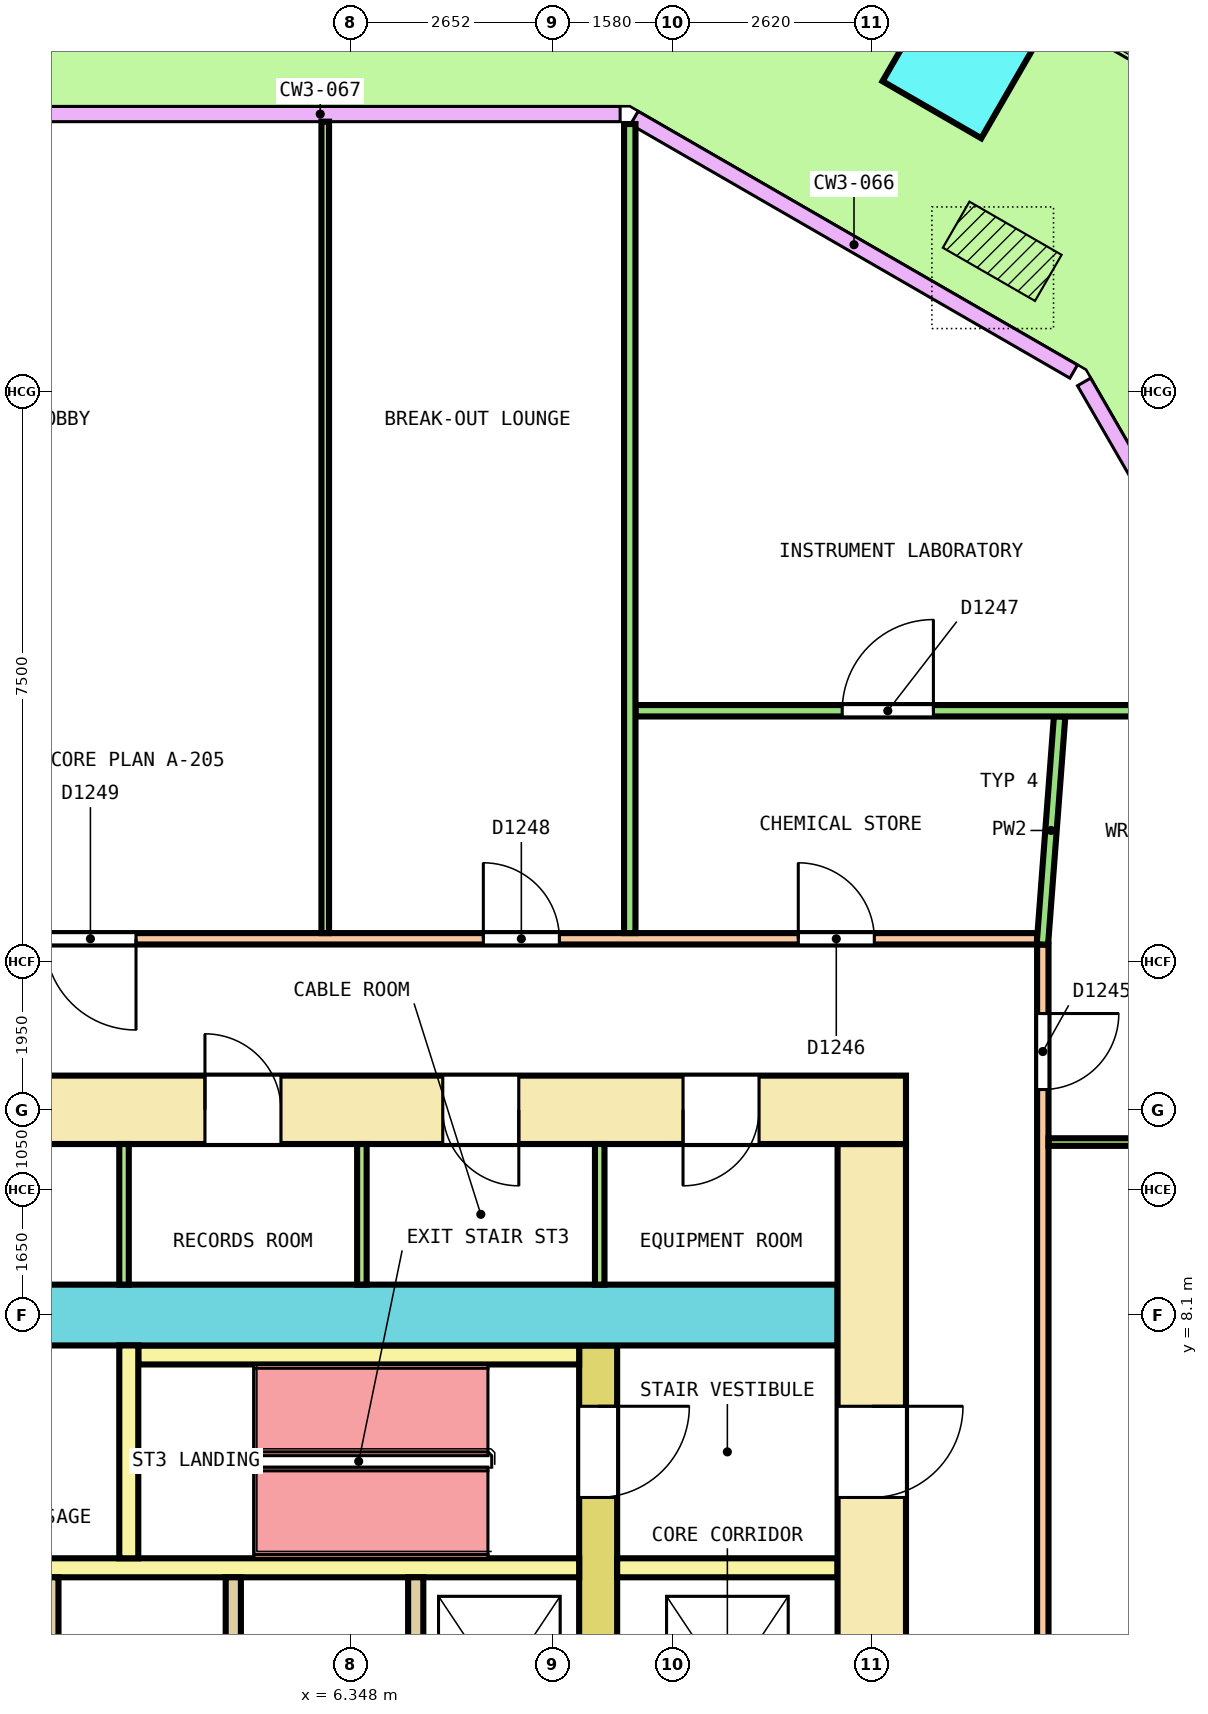
"""IFC4 building model, lengths in metres.
Left out: names, types, materials, properties, quantities, classifications, styles, units other than length and angle.
Written with IfcOpenShell. Run it as: python <this file> out.ifc"""

import sys

from ifc_helpers import new_model, si_unit, direction, frame, frame_2d, origin, origin_2d, place, context, subcontext, project, spatial, rectangle, extrude, element, fill, save


model = new_model("IFC4")
c1 = context("Model", 3, precision=1e-05, world=origin(), true_north=direction((0.0, 1.0)))
c2 = subcontext(c1, "Body", "Model", "MODEL_VIEW")
j1 = project(units=[si_unit("LENGTHUNIT", "METRE"), si_unit("PLANEANGLEUNIT", "RADIAN")], contexts=[c1])
p1 = place(None, origin())
s1 = spatial("IfcSite", under=j1, at=p1, CompositionType="ELEMENT")
p2 = place(p1, origin())
s2 = spatial("IfcBuilding", under=s1, at=p2, CompositionType="ELEMENT")
p3 = place(p2, frame((0.0, 0.0, 19.0)))
s3 = spatial("IfcBuildingStorey", under=s2, at=p3, CompositionType="ELEMENT", Elevation=19.0)
p4 = place(p3, frame((14.366, 24.606, 0.0), z_axis=(0.036205074038, 0.0, 0.999344381389), x_axis=(-0.865315435316, 0.500246354177, 0.031349362627)))
e1 = element("IfcColumn", 1, at=p4, inside=s3, PredefinedType="COLUMN", context=c2, shape_type="SweptSolid", body=[
    extrude(rectangle(XDim=1.5, YDim=1.5, at=origin_2d()), origin(), (0.0, 0.0, 1.0), 4.053),
])
p5 = place(p3, frame((-13.65, 10.8, 0.0), z_axis=(0.0, 0.0, 1.0), x_axis=(1.0, 0.0, 0.0)))
e2 = element("IfcWall", 2, at=p5, inside=s3, PredefinedType="SHEAR", context=c2, shape_type="SweptSolid", body=[
    extrude(rectangle(XDim=27.3, YDim=0.9, at=frame_2d((13.65, 0.0))), origin(), (0.0, 0.0, 1.0), 4.1),
])
p6 = place(p5, frame((1.892, 0.0, 0.0)))
e3 = element("IfcOpeningElement", 3, at=p6, cuts=e2, PredefinedType="OPENING", context=c2, shape_type="SweptSolid", body=[
    extrude(rectangle(XDim=1.0, YDim=2.1, at=frame_2d((0.5, 1.05))), frame((0.0, 0.46, 0.0), z_axis=(0.0, -1.0, 0.0), x_axis=(1.0, 0.0, 0.0)), (0.0, 0.0, 1.0), 0.92),
])
p7 = place(p5, frame((4.97, 0.0, 0.0)))
e4 = element("IfcOpeningElement", 4, at=p7, cuts=e2, PredefinedType="OPENING", context=c2, shape_type="SweptSolid", body=[
    extrude(rectangle(XDim=1.0, YDim=2.1, at=frame_2d((0.5, 1.05))), frame((0.0, 0.46, 0.0), z_axis=(0.0, -1.0, 0.0), x_axis=(1.0, 0.0, 0.0)), (0.0, 0.0, 1.0), 0.92),
])
p8 = place(p5, frame((8.017, 0.0, 0.0)))
e5 = element("IfcOpeningElement", 5, at=p8, cuts=e2, PredefinedType="OPENING", context=c2, shape_type="SweptSolid", body=[
    extrude(rectangle(XDim=1.0, YDim=2.1, at=frame_2d((0.5, 1.05))), frame((0.0, 0.46, 0.0), z_axis=(0.0, -1.0, 0.0), x_axis=(1.0, 0.0, 0.0)), (0.0, 0.0, 1.0), 0.92),
])
p9 = place(p5, frame((11.064, 0.0, 0.0)))
e6 = element("IfcOpeningElement", 6, at=p9, cuts=e2, PredefinedType="OPENING", context=c2, shape_type="SweptSolid", body=[
    extrude(rectangle(XDim=1.0, YDim=2.1, at=frame_2d((0.5, 1.05))), frame((0.0, 0.46, 0.0), z_axis=(0.0, -1.0, 0.0), x_axis=(1.0, 0.0, 0.0)), (0.0, 0.0, 1.0), 0.92),
])
p10 = place(p5, frame((18.077, 0.0, 0.0)))
e7 = element("IfcOpeningElement", 7, at=p10, cuts=e2, PredefinedType="OPENING", context=c2, shape_type="SweptSolid", body=[
    extrude(rectangle(XDim=1.0, YDim=2.1, at=frame_2d((0.5, 1.05))), frame((0.0, 0.46, 0.0), z_axis=(0.0, -1.0, 0.0), x_axis=(1.0, 0.0, 0.0)), (0.0, 0.0, 1.0), 0.92),
])
p11 = place(p5, frame((21.206, 0.0, 0.0)))
e8 = element("IfcOpeningElement", 8, at=p11, cuts=e2, PredefinedType="OPENING", context=c2, shape_type="SweptSolid", body=[
    extrude(rectangle(XDim=1.0, YDim=2.1, at=frame_2d((0.5, 1.05))), frame((0.0, 0.46, 0.0), z_axis=(0.0, -1.0, 0.0), x_axis=(1.0, 0.0, 0.0)), (0.0, 0.0, 1.0), 0.92),
])
p12 = place(p5, frame((24.367, 0.0, 0.0)))
e9 = element("IfcOpeningElement", 9, at=p12, cuts=e2, PredefinedType="OPENING", context=c2, shape_type="SweptSolid", body=[
    extrude(rectangle(XDim=1.0, YDim=2.1, at=frame_2d((0.5, 1.05))), frame((0.0, 0.46, 0.0), z_axis=(0.0, -1.0, 0.0), x_axis=(1.0, 0.0, 0.0)), (0.0, 0.0, 1.0), 0.92),
])
p13 = place(p5, frame((14.575, 0.0, 0.0)))
e10 = element("IfcOpeningElement", 10, at=p13, cuts=e2, PredefinedType="OPENING", context=c2, shape_type="SweptSolid", body=[
    extrude(rectangle(XDim=1.4, YDim=2.1, at=frame_2d((0.7, 1.05))), frame((0.0, 0.46, 0.0), z_axis=(0.0, -1.0, 0.0), x_axis=(1.0, 0.0, 0.0)), (0.0, 0.0, 1.0), 0.92),
])
p14 = place(p3, frame((13.2, -10.35, 0.0), z_axis=(0.0, 0.0, 1.0), x_axis=(0.0, 1.0, 0.0)))
e11 = element("IfcWall", 11, at=p14, inside=s3, PredefinedType="SHEAR", context=c2, shape_type="SweptSolid", body=[
    extrude(rectangle(XDim=20.7, YDim=0.9, at=frame_2d((10.35, 0.0))), origin(), (0.0, 0.0, 1.0), 4.1),
])
p15 = place(p14, frame((9.15, 0.0, 0.0)))
e12 = element("IfcOpeningElement", 12, at=p15, cuts=e11, PredefinedType="OPENING", context=c2, shape_type="SweptSolid", body=[
    extrude(rectangle(XDim=2.4, YDim=2.1, at=frame_2d((1.2, 1.05))), frame((0.0, 0.46, 0.0), z_axis=(0.0, -1.0, 0.0), x_axis=(1.0, 0.0, 0.0)), (0.0, 0.0, 1.0), 0.92),
])
p16 = place(p14, frame((16.05, 0.0, 0.0)))
e13 = element("IfcOpeningElement", 13, at=p16, cuts=e11, PredefinedType="OPENING", context=c2, shape_type="SweptSolid", body=[
    extrude(rectangle(XDim=1.2, YDim=2.1, at=frame_2d((0.6, 1.05))), frame((0.0, 0.46, 0.0), z_axis=(0.0, -1.0, 0.0), x_axis=(1.0, 0.0, 0.0)), (0.0, 0.0, 1.0), 0.92),
])
p17 = place(p14, frame((3.55, 0.0, 0.0)))
e14 = element("IfcOpeningElement", 14, at=p17, cuts=e11, PredefinedType="OPENING", context=c2, shape_type="SweptSolid", body=[
    extrude(rectangle(XDim=1.0, YDim=2.1, at=frame_2d((0.5, 1.05))), frame((0.0, 0.46, 0.0), z_axis=(0.0, -1.0, 0.0), x_axis=(1.0, 0.0, 0.0)), (0.0, 0.0, 1.0), 0.92),
])
p18 = place(p3, frame((-12.75, 8.1, 0.0), z_axis=(0.0, 0.0, 1.0), x_axis=(1.0, 0.0, 0.0)))
e15 = element("IfcWall", 15, at=p18, inside=s3, PredefinedType="SHEAR", context=c2, shape_type="SweptSolid", body=[
    extrude(rectangle(XDim=25.5, YDim=0.8, at=frame_2d((12.75, 0.0))), origin(), (0.0, 0.0, 1.0), 4.1),
])
p19 = place(p18, frame((13.675, 0.0, 0.0)))
e16 = element("IfcOpeningElement", 16, at=p19, cuts=e15, PredefinedType="OPENING", context=c2, shape_type="SweptSolid", body=[
    extrude(rectangle(XDim=1.4, YDim=2.1, at=frame_2d((0.7, 1.05))), frame((0.0, 0.41, 0.0), z_axis=(0.0, -1.0, 0.0), x_axis=(1.0, 0.0, 0.0)), (0.0, 0.0, 1.0), 0.82),
])
p20 = place(p3, frame((9.6, -7.7, 0.0), z_axis=(0.0, 0.0, 1.0), x_axis=(0.0, 1.0, 0.0)))
e17 = element("IfcWall", 17, at=p20, inside=s3, PredefinedType="SHEAR", context=c2, shape_type="SweptSolid", body=[
    extrude(rectangle(XDim=15.4, YDim=0.5, at=frame_2d((7.7, 0.0))), origin(), (0.0, 0.0, 1.0), 4.1),
])
p21 = place(p20, frame((6.5, 0.0, 0.0)))
e18 = element("IfcOpeningElement", 18, at=p21, cuts=e17, PredefinedType="OPENING", context=c2, shape_type="SweptSolid", body=[
    extrude(rectangle(XDim=2.4, YDim=2.1, at=frame_2d((1.2, 1.05))), frame((0.0, 0.26, 0.0), z_axis=(0.0, -1.0, 0.0), x_axis=(1.0, 0.0, 0.0)), (0.0, 0.0, 1.0), 0.52),
])
p22 = place(p20, frame((13.4, 0.0, 0.0)))
e19 = element("IfcOpeningElement", 19, at=p22, cuts=e17, PredefinedType="OPENING", context=c2, shape_type="SweptSolid", body=[
    extrude(rectangle(XDim=1.2, YDim=2.1, at=frame_2d((0.6, 1.05))), frame((0.0, 0.26, 0.0), z_axis=(0.0, -1.0, 0.0), x_axis=(1.0, 0.0, 0.0)), (0.0, 0.0, 1.0), 0.52),
])
p23 = place(p20, frame((0.9, 0.0, 0.0)))
e20 = element("IfcOpeningElement", 20, at=p23, cuts=e17, PredefinedType="OPENING", context=c2, shape_type="SweptSolid", body=[
    extrude(rectangle(XDim=1.0, YDim=2.1, at=frame_2d((0.5, 1.05))), frame((0.0, 0.26, 0.0), z_axis=(0.0, -1.0, 0.0), x_axis=(1.0, 0.0, 0.0)), (0.0, 0.0, 1.0), 0.52),
])
p24 = place(p3, frame((-9.35, 4.775, 0.0), z_axis=(0.0, 0.0, 1.0), x_axis=(1.0, 0.0, 0.0)))
e21 = element("IfcWall", 21, at=p24, inside=s3, PredefinedType="SOLIDWALL", context=c2, shape_type="SweptSolid", body=[
    extrude(rectangle(XDim=18.7, YDim=0.25, at=frame_2d((9.35, 0.0))), origin(), (0.0, 0.0, 1.0), 4.1),
])
p25 = place(p3, frame((9.85, 4.775, 0.0), z_axis=(0.0, 0.0, 1.0), x_axis=(1.0, 0.0, 0.0)))
e22 = element("IfcWall", 22, at=p25, inside=s3, PredefinedType="SOLIDWALL", context=c2, shape_type="SweptSolid", body=[
    extrude(rectangle(XDim=2.9, YDim=0.25, at=frame_2d((1.45, 0.0))), origin(), (0.0, 0.0, 1.0), 4.1),
])
for number, where, z_axis, x_axis in (
    (23, (2.4, 1.75, 0.0), (0.0, 0.0, 1.0), (0.0, 1.0, 0.0)),
    (24, (4.8, 1.75, 0.0), (0.0, 0.0, 1.0), (0.0, 1.0, 0.0)),
    (25, (7.2, 1.75, 0.0), (0.0, 0.0, 1.0), (0.0, 1.0, 0.0)),
):
    element("IfcWall", number, at=place(p3, frame(where, z_axis=z_axis, x_axis=x_axis)), inside=s3, PredefinedType="SOLIDWALL", context=c2, shape_type="SweptSolid", body=[
        extrude(rectangle(XDim=2.9, YDim=0.2, at=frame_2d((1.45, 0.0))), origin(), (0.0, 0.0, 1.0), 4.1),
    ])
p26 = place(p3, frame((3.55, 7.575, 0.0), z_axis=(0.0, 0.0, 1.0), x_axis=(1.0, 0.0, 0.0)))
e26 = element("IfcWall", 26, at=p26, inside=s3, PredefinedType="SOLIDWALL", context=c2, shape_type="SweptSolid", body=[
    extrude(rectangle(XDim=5.8, YDim=0.25, at=frame_2d((2.9, 0.0))), origin(), (0.0, 0.0, 1.0), 4.1),
])
p27 = place(p3, frame((3.425, 4.9, 0.0), z_axis=(0.0, 0.0, 1.0), x_axis=(0.0, 1.0, 0.0)))
e27 = element("IfcWall", 27, at=p27, inside=s3, PredefinedType="SOLIDWALL", context=c2, shape_type="SweptSolid", body=[
    extrude(rectangle(XDim=2.8, YDim=0.25, at=frame_2d((1.4, 0.0))), origin(), (0.0, 0.0, 1.0), 4.1),
])
for number, where, z_axis, x_axis in (
    (28, (3.363, 8.5, 0.0), (0.0, 0.0, 1.0), (0.0, 1.0, 0.0)),
    (29, (6.492, 8.5, 0.0), (0.0, 0.0, 1.0), (0.0, 1.0, 0.0)),
    (30, (9.621, 8.5, 0.0), (0.0, 0.0, 1.0), (0.0, 1.0, 0.0)),
):
    element("IfcWall", number, at=place(p3, frame(where, z_axis=z_axis, x_axis=x_axis)), inside=s3, PredefinedType="PARTITIONING", context=c2, shape_type="SweptSolid", body=[
        extrude(rectangle(XDim=1.85, YDim=0.125, at=frame_2d((0.925, 0.0))), origin(), (0.0, 0.0, 1.0), 4.1),
    ])
p28 = place(p3, frame((15.45, -12.975, 0.0), z_axis=(0.0, 0.0, 1.0), x_axis=(0.0, 1.0, 0.0)))
e31 = element("IfcWall", 31, at=p28, inside=s3, PredefinedType="PARTITIONING", context=c2, shape_type="SweptSolid", body=[
    extrude(rectangle(XDim=25.95, YDim=0.15, at=frame_2d((12.975, 0.0))), origin(), (0.0, 0.0, 1.0), 3.05),
])
p29 = place(p28, frame((12.95, 0.0, 0.0)))
e32 = element("IfcOpeningElement", 32, at=p29, cuts=e31, PredefinedType="OPENING", context=c2, shape_type="SweptSolid", body=[
    extrude(rectangle(XDim=1.2, YDim=2.1, at=frame_2d((0.6, 1.05))), frame((0.0, 0.085, 0.0), z_axis=(0.0, -1.0, 0.0), x_axis=(1.0, 0.0, 0.0)), (0.0, 0.0, 1.0), 0.17),
])
p30 = place(p28, frame((24.042, 0.0, 0.0)))
e33 = element("IfcOpeningElement", 33, at=p30, cuts=e31, PredefinedType="OPENING", context=c2, shape_type="SweptSolid", body=[
    extrude(rectangle(XDim=1.0, YDim=2.1, at=frame_2d((0.5, 1.05))), frame((0.0, 0.085, 0.0), z_axis=(0.0, -1.0, 0.0), x_axis=(1.0, 0.0, 0.0)), (0.0, 0.0, 1.0), 0.17),
])
p31 = place(p28, frame((4.287, 0.0, 0.0)))
e34 = element("IfcOpeningElement", 34, at=p31, cuts=e31, PredefinedType="OPENING", context=c2, shape_type="SweptSolid", body=[
    extrude(rectangle(XDim=1.0, YDim=2.1, at=frame_2d((0.5, 1.05))), frame((0.0, 0.085, 0.0), z_axis=(0.0, -1.0, 0.0), x_axis=(1.0, 0.0, 0.0)), (0.0, 0.0, 1.0), 0.17),
])
p32 = place(p3, frame((-15.375, 13.05, 0.0), z_axis=(0.0, 0.0, 1.0), x_axis=(1.0, 0.0, 0.0)))
e35 = element("IfcWall", 35, at=p32, inside=s3, PredefinedType="PARTITIONING", context=c2, shape_type="SweptSolid", body=[
    extrude(rectangle(XDim=30.75, YDim=0.15, at=frame_2d((15.375, 0.0))), origin(), (0.0, 0.0, 1.0), 3.05),
])
p33 = place(p32, frame((27.608, 0.0, 0.0)))
e36 = element("IfcOpeningElement", 36, at=p33, cuts=e35, PredefinedType="OPENING", context=c2, shape_type="SweptSolid", body=[
    extrude(rectangle(XDim=1.0, YDim=2.1, at=frame_2d((0.5, 1.05))), frame((0.0, 0.085, 0.0), z_axis=(0.0, -1.0, 0.0), x_axis=(1.0, 0.0, 0.0)), (0.0, 0.0, 1.0), 0.17),
])
p34 = place(p32, frame((23.465, 0.0, 0.0)))
e37 = element("IfcOpeningElement", 37, at=p34, cuts=e35, PredefinedType="OPENING", context=c2, shape_type="SweptSolid", body=[
    extrude(rectangle(XDim=1.0, YDim=2.1, at=frame_2d((0.5, 1.05))), frame((0.0, 0.085, 0.0), z_axis=(0.0, -1.0, 0.0), x_axis=(1.0, 0.0, 0.0)), (0.0, 0.0, 1.0), 0.17),
])
p35 = place(p32, frame((17.695, 0.0, 0.0)))
e38 = element("IfcOpeningElement", 38, at=p35, cuts=e35, PredefinedType="OPENING", context=c2, shape_type="SweptSolid", body=[
    extrude(rectangle(XDim=1.2, YDim=2.1, at=frame_2d((0.6, 1.05))), frame((0.0, 0.085, 0.0), z_axis=(0.0, -1.0, 0.0), x_axis=(1.0, 0.0, 0.0)), (0.0, 0.0, 1.0), 0.17),
])
p36 = place(p32, frame((11.084, 0.0, 0.0)))
e39 = element("IfcOpeningElement", 39, at=p36, cuts=e35, PredefinedType="OPENING", context=c2, shape_type="SweptSolid", body=[
    extrude(rectangle(XDim=1.2, YDim=2.1, at=frame_2d((0.6, 1.05))), frame((0.0, 0.085, 0.0), z_axis=(0.0, -1.0, 0.0), x_axis=(1.0, 0.0, 0.0)), (0.0, 0.0, 1.0), 0.17),
])
p37 = place(p32, frame((6.158, 0.0, 0.0)))
e40 = element("IfcOpeningElement", 40, at=p37, cuts=e35, PredefinedType="OPENING", context=c2, shape_type="SweptSolid", body=[
    extrude(rectangle(XDim=1.0, YDim=2.1, at=frame_2d((0.5, 1.05))), frame((0.0, 0.085, 0.0), z_axis=(0.0, -1.0, 0.0), x_axis=(1.0, 0.0, 0.0)), (0.0, 0.0, 1.0), 0.17),
])
p38 = place(p32, frame((0.825, 0.0, 0.0)))
e41 = element("IfcOpeningElement", 41, at=p38, cuts=e35, PredefinedType="OPENING", context=c2, shape_type="SweptSolid", body=[
    extrude(rectangle(XDim=1.0, YDim=2.1, at=frame_2d((0.5, 1.05))), frame((0.0, 0.085, 0.0), z_axis=(0.0, -1.0, 0.0), x_axis=(1.0, 0.0, 0.0)), (0.0, 0.0, 1.0), 0.17),
])
p39 = place(p3, frame((15.444, 12.975, 0.0), z_axis=(0.0, 0.0, 1.0), x_axis=(0.075387075765, 0.997154345529, 0.0)))
e42 = element("IfcWall", 42, at=p39, inside=s3, PredefinedType="PARTITIONING", context=c2, shape_type="SweptSolid", body=[
    extrude(rectangle(XDim=3.009, YDim=0.15, at=frame_2d((1.504, 0.0))), origin(), (0.0, 0.0, 1.0), 3.05),
])
p40 = place(p3, frame((10.091, 16.05, 0.0), z_axis=(0.0, 0.0, 1.0), x_axis=(1.0, 0.0, 0.0)))
e43 = element("IfcWall", 43, at=p40, inside=s3, PredefinedType="PARTITIONING", context=c2, shape_type="SweptSolid", body=[
    extrude(rectangle(XDim=8.284, YDim=0.15, at=frame_2d((4.142, 0.0))), origin(), (0.0, 0.0, 1.0), 3.05),
])
p41 = place(p40, frame((2.719, 0.0, 0.0)))
e44 = element("IfcOpeningElement", 44, at=p41, cuts=e43, PredefinedType="OPENING", context=c2, shape_type="SweptSolid", body=[
    extrude(rectangle(XDim=1.2, YDim=2.1, at=frame_2d((0.6, 1.05))), frame((0.0, 0.085, 0.0), z_axis=(0.0, -1.0, 0.0), x_axis=(1.0, 0.0, 0.0)), (0.0, 0.0, 1.0), 0.17),
])
p42 = place(p3, frame((10.016, 13.125, 0.0), z_axis=(0.0, 0.0, 1.0), x_axis=(0.0, 1.0, 0.0)))
e45 = element("IfcWall", 45, at=p42, inside=s3, PredefinedType="PARTITIONING", context=c2, shape_type="SweptSolid", body=[
    extrude(rectangle(XDim=10.644, YDim=0.15, at=frame_2d((5.322, 0.0))), origin(), (0.0, 0.0, 1.0), 3.05),
])
p43 = place(p3, frame((15.525, 10.376, 0.0), z_axis=(0.0, 0.0, 1.0), x_axis=(1.0, 0.0, 0.0)))
e46 = element("IfcWall", 46, at=p43, inside=s3, PredefinedType="PARTITIONING", context=c2, shape_type="SweptSolid", body=[
    extrude(rectangle(XDim=3.0, YDim=0.1, at=frame_2d((1.5, 0.0))), origin(), (0.0, 0.0, 1.0), 3.05),
])
p44 = place(p3, frame((6.01, 13.125, 0.0), z_axis=(0.0, 0.0, 1.0), x_axis=(0.0, 1.0, 0.0)))
e47 = element("IfcWall", 47, at=p44, inside=s3, PredefinedType="PARTITIONING", context=c2, shape_type="SweptSolid", body=[
    extrude(rectangle(XDim=10.675, YDim=0.1, at=frame_2d((5.337, 0.0))), origin(), (0.0, 0.0, 1.0), 3.05),
])
p45 = place(p22, origin())
e48 = element("IfcDoor", 48, at=p45, inside=s3, OperationType="SINGLE_SWING_RIGHT", PredefinedType="DOOR", context=c2, shape_type="SweptSolid", body=[
    extrude(rectangle(XDim=1.2, YDim=2.1, at=frame_2d((0.6, 1.05))), frame((0.0, 0.2, 0.0), z_axis=(0.0, -1.0, 0.0), x_axis=(1.0, 0.0, 0.0)), (0.0, 0.0, 1.0), 0.4),
])
fill(e19, e48)
p46 = place(p16, origin())
e49 = element("IfcDoor", 49, at=p46, inside=s3, OperationType="SINGLE_SWING_LEFT", PredefinedType="DOOR", context=c2, shape_type="SweptSolid", body=[
    extrude(rectangle(XDim=1.2, YDim=2.1, at=frame_2d((0.6, 1.05))), frame((0.0, 0.3, 0.0), z_axis=(0.0, -1.0, 0.0), x_axis=(1.0, 0.0, 0.0)), (0.0, 0.0, 1.0), 0.6),
])
fill(e13, e49)
p47 = place(p10, origin())
e50 = element("IfcDoor", 50, at=p47, inside=s3, OperationType="SINGLE_SWING_RIGHT", PredefinedType="DOOR", context=c2, shape_type="SweptSolid", body=[
    extrude(rectangle(XDim=1.0, YDim=2.1, at=frame_2d((0.5, 1.05))), frame((0.0, 0.3, 0.0), z_axis=(0.0, -1.0, 0.0), x_axis=(1.0, 0.0, 0.0)), (0.0, 0.0, 1.0), 0.6),
])
fill(e7, e50)
p48 = place(p11, origin())
e51 = element("IfcDoor", 51, at=p48, inside=s3, OperationType="SINGLE_SWING_LEFT", PredefinedType="DOOR", context=c2, shape_type="SweptSolid", body=[
    extrude(rectangle(XDim=1.0, YDim=2.1, at=frame_2d((0.5, 1.05))), frame((0.0, 0.3, 0.0), z_axis=(0.0, -1.0, 0.0), x_axis=(1.0, 0.0, 0.0)), (0.0, 0.0, 1.0), 0.6),
])
fill(e8, e51)
p49 = place(p12, origin())
e52 = element("IfcDoor", 52, at=p49, inside=s3, OperationType="SINGLE_SWING_RIGHT", PredefinedType="DOOR", context=c2, shape_type="SweptSolid", body=[
    extrude(rectangle(XDim=1.0, YDim=2.1, at=frame_2d((0.5, 1.05))), frame((0.0, 0.3, 0.0), z_axis=(0.0, -1.0, 0.0), x_axis=(1.0, 0.0, 0.0)), (0.0, 0.0, 1.0), 0.6),
])
fill(e9, e52)
p50 = place(p30, origin())
e53 = element("IfcDoor", 53, at=p50, inside=s3, OperationType="SINGLE_SWING_RIGHT", PredefinedType="DOOR", context=c2, shape_type="SweptSolid", body=[
    extrude(rectangle(XDim=1.0, YDim=2.1, at=frame_2d((0.5, 1.05))), frame((0.0, 0.025, 0.0), z_axis=(0.0, -1.0, 0.0), x_axis=(1.0, 0.0, 0.0)), (0.0, 0.0, 1.0), 0.05),
])
fill(e33, e53)
p51 = place(p33, origin())
e54 = element("IfcDoor", 54, at=p51, inside=s3, OperationType="SINGLE_SWING_LEFT", PredefinedType="DOOR", context=c2, shape_type="SweptSolid", body=[
    extrude(rectangle(XDim=1.0, YDim=2.1, at=frame_2d((0.5, 1.05))), frame((0.0, 0.025, 0.0), z_axis=(0.0, -1.0, 0.0), x_axis=(1.0, 0.0, 0.0)), (0.0, 0.0, 1.0), 0.05),
])
fill(e36, e54)
p52 = place(p41, origin())
e55 = element("IfcDoor", 55, at=p52, inside=s3, OperationType="DOUBLE_DOOR_SINGLE_SWING", PredefinedType="DOOR", context=c2, shape_type="SweptSolid", body=[
    extrude(rectangle(XDim=1.2, YDim=2.1, at=frame_2d((0.6, 1.05))), frame((0.0, 0.025, 0.0), z_axis=(0.0, -1.0, 0.0), x_axis=(1.0, 0.0, 0.0)), (0.0, 0.0, 1.0), 0.05),
])
fill(e44, e55)
p53 = place(p34, origin())
e56 = element("IfcDoor", 56, at=p53, inside=s3, OperationType="SINGLE_SWING_RIGHT", PredefinedType="DOOR", context=c2, shape_type="SweptSolid", body=[
    extrude(rectangle(XDim=1.0, YDim=2.1, at=frame_2d((0.5, 1.05))), frame((0.0, 0.025, 0.0), z_axis=(0.0, -1.0, 0.0), x_axis=(1.0, 0.0, 0.0)), (0.0, 0.0, 1.0), 0.05),
])
fill(e37, e56)
p54 = place(p35, origin())
e57 = element("IfcDoor", 57, at=p54, inside=s3, OperationType="DOUBLE_DOOR_SINGLE_SWING", PredefinedType="DOOR", context=c2, shape_type="SweptSolid", body=[
    extrude(rectangle(XDim=1.2, YDim=2.1, at=frame_2d((0.6, 1.05))), frame((0.0, 0.025, 0.0), z_axis=(0.0, -1.0, 0.0), x_axis=(1.0, 0.0, 0.0)), (0.0, 0.0, 1.0), 0.05),
])
fill(e38, e57)
save(model, sys.argv[1])
